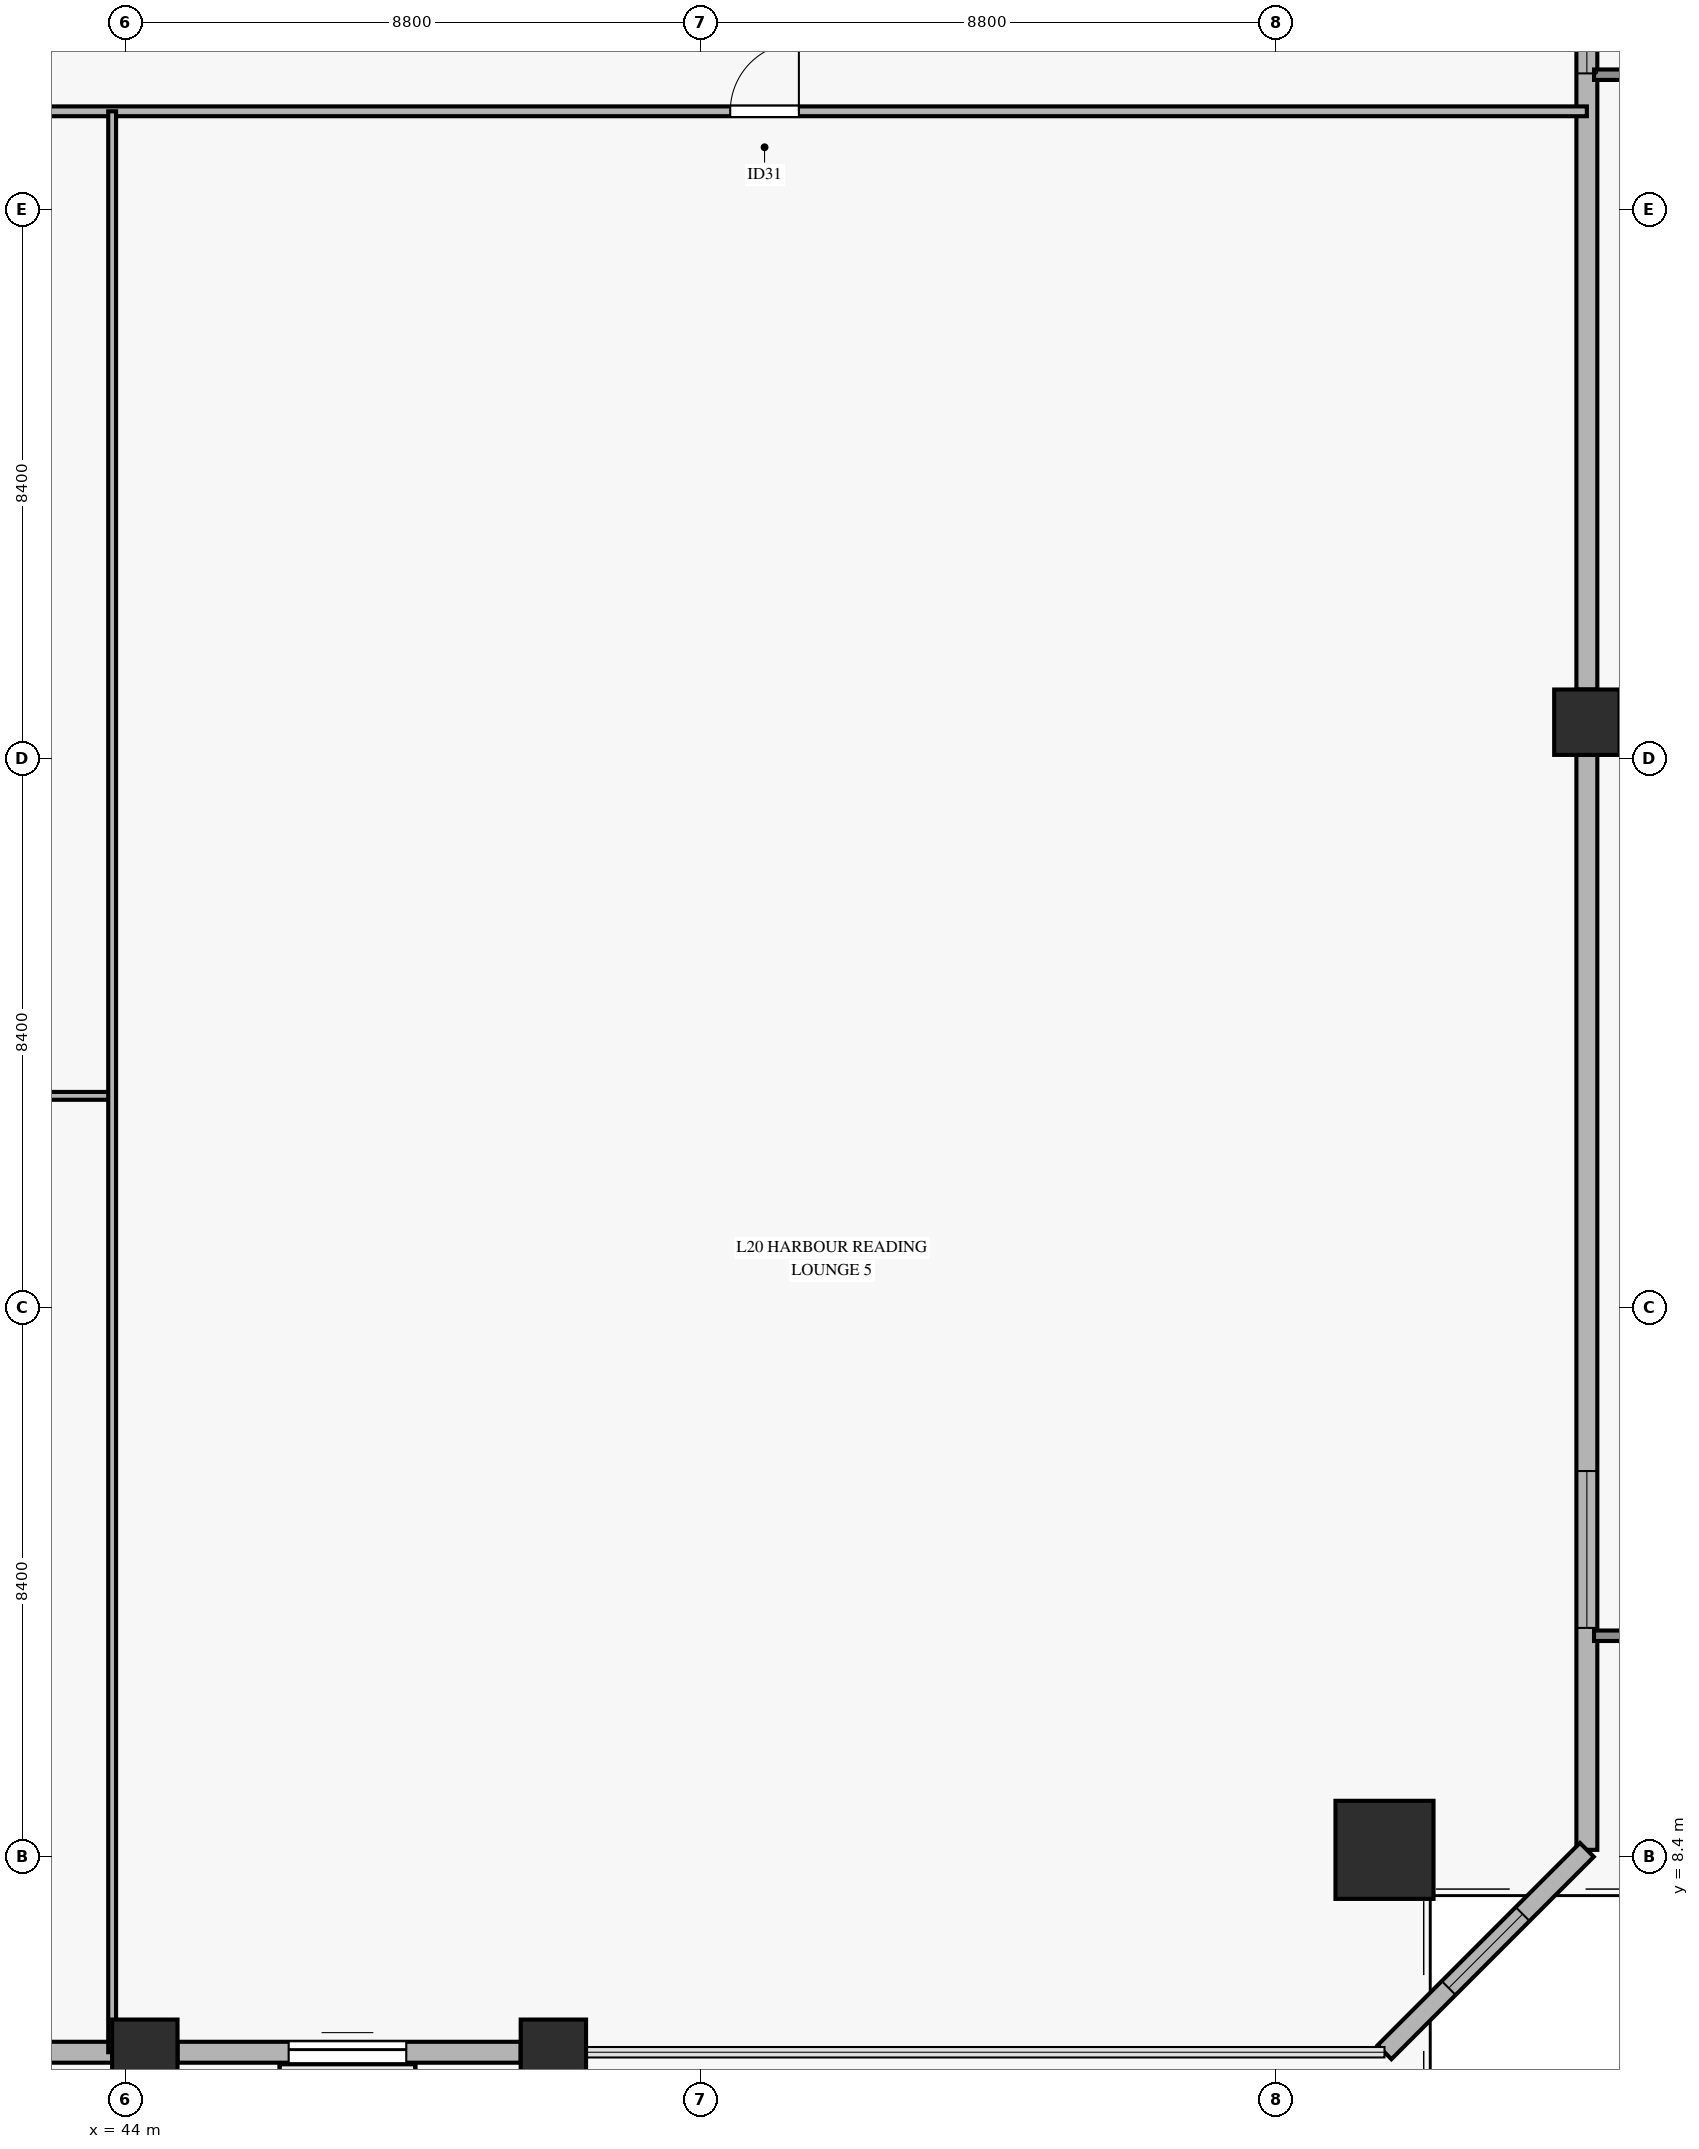
"""IFC4 building model, lengths in metres.
Left out: names, types, materials, properties, quantities, classifications, styles, units other than length and angle.
Written with IfcOpenShell. Run it as: python <this file> out.ifc"""

import sys

from ifc_helpers import new_model, si_unit, direction, frame, frame_2d, origin, origin_2d, place, context, subcontext, project, spatial, rectangle, hollow_rectangle, extrude, source, transform, mapped, element, fill, save


model = new_model("IFC4")
c1 = context("Model", 3, precision=1e-05, world=origin(), true_north=direction((0.0, 1.0)))
c2 = subcontext(c1, "Body", "Model", "MODEL_VIEW")
j1 = project(units=[si_unit("LENGTHUNIT", "METRE"), si_unit("PLANEANGLEUNIT", "RADIAN")], contexts=[c1])
p1 = place(None, origin())
s1 = spatial("IfcSite", under=j1, at=p1, CompositionType="ELEMENT")
p2 = place(p1, origin())
s2 = spatial("IfcBuilding", under=s1, at=p2, CompositionType="ELEMENT")
p3 = place(p2, frame((0.0, 0.0, 83.5)))
s3 = spatial("IfcBuildingStorey", under=s2, at=p3, CompositionType="ELEMENT", Elevation=83.5)
m1 = source(origin(), c2, "Body", "SweptSolid", [
    extrude(hollow_rectangle(XDim=1.5, YDim=1.5, WallThickness=0.07, at=origin_2d()), origin(), (0.0, 0.0, 1.0), 3.72),
])
p4 = place(p3, frame((63.265, 8.505, 0.0), z_axis=(-0.056181856516, 0.134744569424, 0.989286358952), x_axis=(-0.922983788144, -0.38483883227, 0.0)))
e1 = element("IfcColumn", 1, at=p4, inside=s3, PredefinedType="COLUMN", context=c2, shape_type="MappedRepresentation", body=[
    mapped(m1, transform((0.0, 0.0, 0.0), x_axis=(1.0, 0.0, 0.0), y_axis=(0.0, 1.0, 0.0), z_axis=(0.0, 0.0, 1.0), scale=1.0)),
])
m2 = source(origin(), c2, "Body", "SweptSolid", [
    extrude(hollow_rectangle(XDim=1.0, YDim=1.0, WallThickness=0.045, at=origin_2d()), origin(), (0.0, 0.0, 1.0), 3.718),
])
for number, where, z_axis, x_axis in (
    (2, (44.3, 5.409, 0.0), (0.0, 0.142, 0.99), (-1.0, 0.0, 0.0)),
    (3, (50.55, 5.409, 0.0), (0.0, 0.142, 0.99), (-1.0, 0.0, 0.0)),
):
    element("IfcColumn", number, at=place(p3, frame(where, z_axis=z_axis, x_axis=x_axis)), inside=s3, PredefinedType="COLUMN", context=c2, shape_type="MappedRepresentation", body=[
        mapped(m2, transform((0.0, 0.0, 0.0), x_axis=(1.0, 0.0, 0.0), y_axis=(0.0, 1.0, 0.0), z_axis=(0.0, 0.0, 1.0), scale=1.0)),
    ])
m3 = source(origin(), c2, "Body", "SweptSolid", [
    extrude(hollow_rectangle(XDim=1.0, YDim=1.0, WallThickness=0.045, at=origin_2d()), origin(), (0.0, 0.0, 1.0), 3.697),
])
p5 = place(p3, frame((66.361, 25.755, 0.0), z_axis=(-0.063597299043, 0.071191992075, 0.995433113684), x_axis=(-0.745765790273, -0.666208215244, 0.0)))
e4 = element("IfcColumn", 4, at=p5, inside=s3, PredefinedType="COLUMN", context=c2, shape_type="MappedRepresentation", body=[
    mapped(m3, transform((0.0, 0.0, 0.0), x_axis=(1.0, 0.0, 0.0), y_axis=(0.0, 1.0, 0.0), z_axis=(0.0, 0.0, 1.0), scale=1.0)),
])
p6 = place(p3, frame((38.05, 5.409, 0.0), z_axis=(0.0, 0.0, 1.0), x_axis=(1.0, 0.0, 0.0)))
e5 = element("IfcWall", 5, at=p6, inside=s3, PredefinedType="SOLIDWALL", context=c2, shape_type="SweptSolid", body=[
    extrude(rectangle(XDim=5.75, YDim=0.32, at=frame_2d((2.875, 0.0))), origin(), (0.0, 0.0, 1.0), 3.16),
])
p7 = place(p3, frame((44.8, 5.409, 0.0), z_axis=(0.0, 0.0, 1.0), x_axis=(1.0, 0.0, 0.0)))
e6 = element("IfcWall", 6, at=p7, inside=s3, PredefinedType="SOLIDWALL", context=c2, shape_type="SweptSolid", body=[
    extrude(rectangle(XDim=5.25, YDim=0.32, at=frame_2d((2.625, 0.0))), origin(), (0.0, 0.0, 1.0), 3.16),
])
p8 = place(p7, frame((1.7, 0.0, 0.0)))
e7 = element("IfcOpeningElement", 7, at=p8, cuts=e6, PredefinedType="OPENING", context=c2, shape_type="SweptSolid", body=[
    extrude(rectangle(XDim=1.8, YDim=2.25, at=frame_2d((0.9, 1.125))), frame((0.0, 0.17, 0.0), z_axis=(0.0, -1.0, 0.0), x_axis=(1.0, 0.0, 0.0)), (0.0, 0.0, 1.0), 0.34),
])
p9 = place(p3, frame((66.361, 8.505, 0.0), z_axis=(0.0, 0.0, 1.0), x_axis=(0.0, 1.0, 0.0)))
e8 = element("IfcWall", 8, at=p9, inside=s3, PredefinedType="SOLIDWALL", context=c2, shape_type="SweptSolid", body=[
    extrude(rectangle(XDim=16.75, YDim=0.32, at=frame_2d((8.375, 0.0))), origin(), (0.0, 0.0, 1.0), 3.16),
])
p10 = place(p9, frame((3.395, 0.0, 0.45)))
e9 = element("IfcOpeningElement", 9, at=p10, cuts=e8, PredefinedType="OPENING", context=c2, shape_type="SweptSolid", body=[
    extrude(rectangle(XDim=2.4, YDim=2.1, at=frame_2d((1.2, 1.05))), frame((0.0, 0.17, 0.0), z_axis=(0.0, -1.0, 0.0), x_axis=(1.0, 0.0, 0.0)), (0.0, 0.0, 1.0), 0.34),
])
p11 = place(p3, frame((66.361, 26.255, 0.0), z_axis=(0.0, 0.0, 1.0), x_axis=(0.0, 1.0, 0.0)))
e10 = element("IfcWall", 10, at=p11, inside=s3, PredefinedType="SOLIDWALL", context=c2, shape_type="SweptSolid", body=[
    extrude(rectangle(XDim=16.749, YDim=0.32, at=frame_2d((8.375, 0.0))), origin(), (0.0, 0.0, 1.0), 3.16),
])
p12 = place(p11, frame((9.425, 0.0, 0.45)))
e11 = element("IfcOpeningElement", 11, at=p12, cuts=e10, PredefinedType="OPENING", context=c2, shape_type="SweptSolid", body=[
    extrude(rectangle(XDim=1.2, YDim=2.0, at=frame_2d((0.6, 1.0))), frame((0.0, 0.17, 0.0), z_axis=(0.0, -1.0, 0.0), x_axis=(1.0, 0.0, 0.0)), (0.0, 0.0, 1.0), 0.34),
])
p13 = place(p3, frame((63.265, 5.409, 0.0), z_axis=(0.0, 0.0, 1.0), x_axis=(0.707134660098, 0.707078901175, 0.0)))
e12 = element("IfcWall", 12, at=p13, inside=s3, PredefinedType="SOLIDWALL", context=c2, shape_type="SweptSolid", body=[
    extrude(rectangle(XDim=4.378, YDim=0.3, at=frame_2d((2.189, 0.0))), origin(), (0.0, 0.0, 1.0), 3.16),
])
p14 = place(p13, frame((1.389, 0.0, 0.45)))
e13 = element("IfcOpeningElement", 13, at=p14, cuts=e12, PredefinedType="OPENING", context=c2, shape_type="SweptSolid", body=[
    extrude(rectangle(XDim=1.6, YDim=2.0, at=frame_2d((0.8, 1.0))), frame((0.0, 0.16, 0.0), z_axis=(0.0, -1.0, 0.0), x_axis=(1.0, 0.0, 0.0)), (0.0, 0.0, 1.0), 0.32),
])
p15 = place(p3, frame((4.04, 35.1, 0.0), z_axis=(0.0, 0.0, 1.0), x_axis=(1.0, 0.0, 0.0)))
e14 = element("IfcWall", 14, at=p15, inside=s3, PredefinedType="PARTITIONING", context=c2, shape_type="SweptSolid", body=[
    extrude(rectangle(XDim=62.321, YDim=0.15, at=frame_2d((31.161, 0.0))), origin(), (0.0, 0.0, 1.0), 2.765),
])
p16 = place(p15, frame((8.462, 0.0, 0.0)))
e15 = element("IfcOpeningElement", 15, at=p16, cuts=e14, PredefinedType="OPENING", context=c2, shape_type="SweptSolid", body=[
    extrude(rectangle(XDim=1.05, YDim=2.15, at=frame_2d((0.525, 1.075))), frame((0.0, 0.085, 0.0), z_axis=(0.0, -1.0, 0.0), x_axis=(1.0, 0.0, 0.0)), (0.0, 0.0, 1.0), 0.17),
])
p17 = place(p15, frame((21.966, 0.0, 0.0)))
e16 = element("IfcOpeningElement", 16, at=p17, cuts=e14, PredefinedType="OPENING", context=c2, shape_type="SweptSolid", body=[
    extrude(rectangle(XDim=1.05, YDim=2.15, at=frame_2d((0.525, 1.075))), frame((0.0, 0.085, 0.0), z_axis=(0.0, -1.0, 0.0), x_axis=(1.0, 0.0, 0.0)), (0.0, 0.0, 1.0), 0.17),
])
p18 = place(p15, frame((28.646, 0.0, 0.0)))
e17 = element("IfcOpeningElement", 17, at=p18, cuts=e14, PredefinedType="OPENING", context=c2, shape_type="SweptSolid", body=[
    extrude(rectangle(XDim=1.05, YDim=2.15, at=frame_2d((0.525, 1.075))), frame((0.0, 0.085, 0.0), z_axis=(0.0, -1.0, 0.0), x_axis=(1.0, 0.0, 0.0)), (0.0, 0.0, 1.0), 0.17),
])
p19 = place(p15, frame((35.606, 0.0, 0.0)))
e18 = element("IfcOpeningElement", 18, at=p19, cuts=e14, PredefinedType="OPENING", context=c2, shape_type="SweptSolid", body=[
    extrude(rectangle(XDim=1.05, YDim=2.15, at=frame_2d((0.525, 1.075))), frame((0.0, 0.085, 0.0), z_axis=(0.0, -1.0, 0.0), x_axis=(1.0, 0.0, 0.0)), (0.0, 0.0, 1.0), 0.17),
])
p20 = place(p15, frame((49.216, 0.0, 0.0)))
e19 = element("IfcOpeningElement", 19, at=p20, cuts=e14, PredefinedType="OPENING", context=c2, shape_type="SweptSolid", body=[
    extrude(rectangle(XDim=1.05, YDim=2.15, at=frame_2d((0.525, 1.075))), frame((0.0, 0.085, 0.0), z_axis=(0.0, -1.0, 0.0), x_axis=(1.0, 0.0, 0.0)), (0.0, 0.0, 1.0), 0.17),
])
p21 = place(p3, frame((36.6, 20.039, 0.0), z_axis=(0.0, 0.0, 1.0), x_axis=(1.0, 0.0, 0.0)))
e20 = element("IfcWall", 20, at=p21, inside=s3, PredefinedType="PARTITIONING", context=c2, shape_type="SweptSolid", body=[
    extrude(rectangle(XDim=7.2, YDim=0.12, at=frame_2d((3.6, 0.0))), origin(), (0.0, 0.0, 1.0), 2.765),
])
p22 = place(p21, frame((3.187, 0.0, 0.0)))
e21 = element("IfcOpeningElement", 21, at=p22, cuts=e20, PredefinedType="OPENING", context=c2, shape_type="SweptSolid", body=[
    extrude(rectangle(XDim=0.95, YDim=2.1, at=frame_2d((0.475, 1.05))), frame((0.0, 0.07, 0.0), z_axis=(0.0, -1.0, 0.0), x_axis=(1.0, 0.0, 0.0)), (0.0, 0.0, 1.0), 0.14),
])
p23 = place(p3, frame((43.8, 5.409, 0.0), z_axis=(0.0, 0.0, 1.0), x_axis=(0.0, 1.0, 0.0)))
e22 = element("IfcWall", 22, at=p23, inside=s3, PredefinedType="PARTITIONING", context=c2, shape_type="SweptSolid", body=[
    extrude(rectangle(XDim=29.691, YDim=0.12, at=frame_2d((14.846, 0.0))), origin(), (0.0, 0.0, 1.0), 3.165),
])
m4 = source(origin(), c2, "Body", "SweptSolid", [
    extrude(rectangle(XDim=1.8, YDim=2.25, at=frame_2d((0.9, 1.125))), frame((0.0, 0.025, 0.0), z_axis=(0.0, -1.0, 0.0), x_axis=(1.0, 0.0, 0.0)), (0.0, 0.0, 1.0), 0.05),
])
p24 = place(p8, origin())
e23 = element("IfcDoor", 23, at=p24, inside=s3, OperationType="SLIDING_TO_LEFT", PredefinedType="DOOR", context=c2, shape_type="MappedRepresentation", body=[
    mapped(m4, transform((0.0, 0.0, 0.0), x_axis=(1.0, 0.0, 0.0), y_axis=(0.0, 1.0, 0.0), z_axis=(0.0, 0.0, 1.0), scale=1.0)),
])
fill(e7, e23)
m5 = source(origin(), c2, "Body", "SweptSolid", [
    extrude(rectangle(XDim=2.4, YDim=2.1, at=frame_2d((1.2, 1.05))), frame((0.0, 0.03, 0.0), z_axis=(0.0, -1.0, 0.0), x_axis=(1.0, 0.0, 0.0)), (0.0, 0.0, 1.0), 0.06),
])
p25 = place(p10, origin())
e24 = element("IfcWindow", 24, at=p25, inside=s3, PartitioningType="SINGLE_PANEL", PredefinedType="WINDOW", context=c2, shape_type="MappedRepresentation", body=[
    mapped(m5, transform((0.0, 0.0, 0.0), x_axis=(1.0, 0.0, 0.0), y_axis=(0.0, 1.0, 0.0), z_axis=(0.0, 0.0, 1.0), scale=1.0)),
])
fill(e9, e24)
m6 = source(origin(), c2, "Body", "SweptSolid", [
    extrude(rectangle(XDim=1.2, YDim=2.0, at=frame_2d((0.6, 1.0))), frame((0.0, 0.03, 0.0), z_axis=(0.0, -1.0, 0.0), x_axis=(1.0, 0.0, 0.0)), (0.0, 0.0, 1.0), 0.06),
])
p26 = place(p12, origin())
e25 = element("IfcWindow", 25, at=p26, inside=s3, PartitioningType="SINGLE_PANEL", PredefinedType="WINDOW", context=c2, shape_type="MappedRepresentation", body=[
    mapped(m6, transform((0.0, 0.0, 0.0), x_axis=(1.0, 0.0, 0.0), y_axis=(0.0, 1.0, 0.0), z_axis=(0.0, 0.0, 1.0), scale=1.0)),
])
fill(e11, e25)
m7 = source(origin(), c2, "Body", "SweptSolid", [
    extrude(rectangle(XDim=1.6, YDim=2.0, at=frame_2d((0.8, 1.0))), frame((0.0, 0.03, 0.0), z_axis=(0.0, -1.0, 0.0), x_axis=(1.0, 0.0, 0.0)), (0.0, 0.0, 1.0), 0.06),
])
p27 = place(p14, origin())
e26 = element("IfcWindow", 26, at=p27, inside=s3, PartitioningType="SINGLE_PANEL", PredefinedType="WINDOW", context=c2, shape_type="MappedRepresentation", body=[
    mapped(m7, transform((0.0, 0.0, 0.0), x_axis=(1.0, 0.0, 0.0), y_axis=(0.0, 1.0, 0.0), z_axis=(0.0, 0.0, 1.0), scale=1.0)),
])
fill(e13, e26)
m8 = source(origin(), c2, "Body", "SweptSolid", [
    extrude(rectangle(XDim=1.05, YDim=2.15, at=frame_2d((0.525, 1.075))), frame((0.0, 0.025, 0.0), z_axis=(0.0, -1.0, 0.0), x_axis=(1.0, 0.0, 0.0)), (0.0, 0.0, 1.0), 0.05),
])
p28 = place(p20, origin())
e27 = element("IfcDoor", 27, at=p28, inside=s3, OperationType="SINGLE_SWING_RIGHT", PredefinedType="DOOR", context=c2, shape_type="MappedRepresentation", body=[
    mapped(m8, transform((0.0, 0.0, 0.0), x_axis=(1.0, 0.0, 0.0), y_axis=(0.0, 1.0, 0.0), z_axis=(0.0, 0.0, 1.0), scale=1.0)),
])
fill(e19, e27)
save(model, sys.argv[1])
